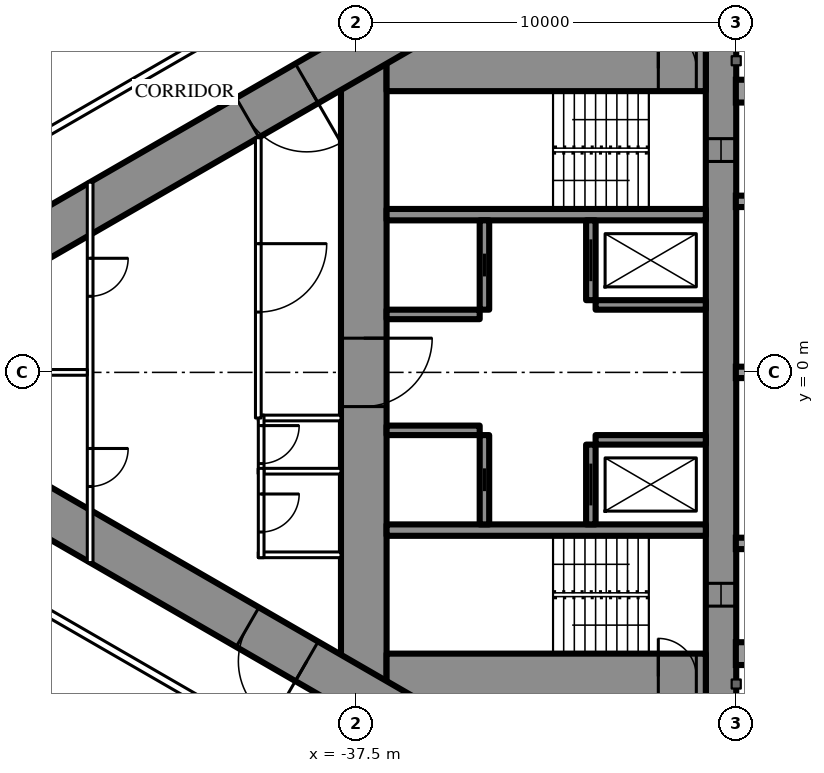
"""IFC4 building model, lengths in metres.
Left out: names, types, materials, properties, quantities, classifications, styles, units other than length and angle.
Written with IfcOpenShell. Run it as: python <this file> out.ifc"""

import sys

from ifc_helpers import new_model, si_unit, direction, frame, frame_2d, origin, place, context, subcontext, project, spatial, rectangle, extrude, element, fill, save


model = new_model("IFC4")
c1 = context("Model", 3, precision=1e-05, world=origin(), true_north=direction((0.0, 1.0)))
c2 = subcontext(c1, "Body", "Model", "MODEL_VIEW")
j1 = project(units=[si_unit("LENGTHUNIT", "METRE"), si_unit("PLANEANGLEUNIT", "RADIAN")], contexts=[c1])
p1 = place(None, origin())
s1 = spatial("IfcSite", under=j1, at=p1, CompositionType="ELEMENT")
p2 = place(p1, origin())
s2 = spatial("IfcBuilding", under=s1, at=p2, CompositionType="ELEMENT")
p3 = place(p2, frame((0.0, 0.0, 28.5)))
s3 = spatial("IfcBuildingStorey", under=s2, at=p3, CompositionType="ELEMENT", Elevation=28.5)
p4 = place(p3, frame((-27.9, 8.6, 0.0), z_axis=(0.0, 0.0, 1.0), x_axis=(0.0, -1.0, 0.0)))
e1 = element("IfcWall", 1, at=p4, inside=s3, PredefinedType="SHEAR", context=c2, shape_type="SweptSolid", body=[
    extrude(rectangle(XDim=17.2, YDim=0.8, at=frame_2d((8.6, 0.0))), origin(), (0.0, 0.0, 1.0), 3.5),
])
p5 = place(p4, frame((2.45, 0.0, 0.6)))
e2 = element("IfcOpeningElement", 2, at=p5, cuts=e1, PredefinedType="OPENING", context=c2, shape_type="SweptSolid", body=[
    extrude(rectangle(XDim=0.6, YDim=2.1, at=frame_2d((0.3, 1.05))), frame((0.0, 0.41, 0.0), z_axis=(0.0, -1.0, 0.0), x_axis=(1.0, 0.0, 0.0)), (0.0, 0.0, 1.0), 0.82),
])
p6 = place(p4, frame((14.15, 0.0, 0.6)))
e3 = element("IfcOpeningElement", 3, at=p6, cuts=e1, PredefinedType="OPENING", context=c2, shape_type="SweptSolid", body=[
    extrude(rectangle(XDim=0.6, YDim=2.1, at=frame_2d((0.3, 1.05))), frame((0.0, 0.41, 0.0), z_axis=(0.0, -1.0, 0.0), x_axis=(1.0, 0.0, 0.0)), (0.0, 0.0, 1.0), 0.82),
])
p7 = place(p3, frame((-37.3, 8.6, 0.0), z_axis=(0.0, 0.0, 1.0), x_axis=(0.0, -1.0, 0.0)))
e4 = element("IfcWall", 4, at=p7, inside=s3, PredefinedType="SHEAR", context=c2, shape_type="SweptSolid", body=[
    extrude(rectangle(XDim=17.2, YDim=1.2, at=frame_2d((8.6, 0.0))), origin(), (0.0, 0.0, 1.0), 3.5),
])
p8 = place(p7, frame((7.7, 0.0, 0.0)))
e5 = element("IfcOpeningElement", 5, at=p8, cuts=e4, PredefinedType="OPENING", context=c2, shape_type="SweptSolid", body=[
    extrude(rectangle(XDim=1.8, YDim=2.2, at=frame_2d((0.9, 1.1))), frame((0.0, 0.61, 0.0), z_axis=(0.0, -1.0, 0.0), x_axis=(1.0, 0.0, 0.0)), (0.0, 0.0, 1.0), 1.22),
])
p9 = place(p3, frame((-28.3, 8.0, 0.0), z_axis=(0.0, 0.0, 1.0), x_axis=(-1.0, 0.0, 0.0)))
e6 = element("IfcWall", 6, at=p9, inside=s3, PredefinedType="SHEAR", context=c2, shape_type="SweptSolid", body=[
    extrude(rectangle(XDim=8.4, YDim=1.2, at=frame_2d((4.2, 0.0))), origin(), (0.0, 0.0, 1.0), 3.5),
])
p10 = place(p9, frame((0.25, 0.0, 0.0)))
e7 = element("IfcOpeningElement", 7, at=p10, cuts=e6, PredefinedType="OPENING", context=c2, shape_type="SweptSolid", body=[
    extrude(rectangle(XDim=1.0, YDim=2.2, at=frame_2d((0.5, 1.1))), frame((0.0, 0.61, 0.0), z_axis=(0.0, -1.0, 0.0), x_axis=(1.0, 0.0, 0.0)), (0.0, 0.0, 1.0), 1.22),
])
p11 = place(p3, frame((-28.3, -8.0, 0.0), z_axis=(0.0, 0.0, 1.0), x_axis=(-1.0, 0.0, 0.0)))
e8 = element("IfcWall", 8, at=p11, inside=s3, PredefinedType="SHEAR", context=c2, shape_type="SweptSolid", body=[
    extrude(rectangle(XDim=8.4, YDim=1.2, at=frame_2d((4.2, 0.0))), origin(), (0.0, 0.0, 1.0), 3.5),
])
p12 = place(p11, frame((0.25, 0.0, 0.0)))
e9 = element("IfcOpeningElement", 9, at=p12, cuts=e8, PredefinedType="OPENING", context=c2, shape_type="SweptSolid", body=[
    extrude(rectangle(XDim=1.0, YDim=2.2, at=frame_2d((0.5, 1.1))), frame((0.0, 0.61, 0.0), z_axis=(0.0, -1.0, 0.0), x_axis=(1.0, 0.0, 0.0)), (0.0, 0.0, 1.0), 1.22),
])
for number, where, z_axis, x_axis in (
    (10, (-28.3, 4.15, 0.0), (0.0, 0.0, 1.0), (-1.0, 0.0, 0.0)),
    (11, (-28.3, -4.15, 0.0), (0.0, 0.0, 1.0), (-1.0, 0.0, 0.0)),
):
    element("IfcWall", number, at=place(p3, frame(where, z_axis=z_axis, x_axis=x_axis)), inside=s3, PredefinedType="SHEAR", context=c2, shape_type="SweptSolid", body=[
        extrude(rectangle(XDim=8.4, YDim=0.3, at=frame_2d((4.2, 0.0))), origin(), (0.0, 0.0, 1.0), 3.5),
    ])
p13 = place(p3, frame((-31.325, 4.0, 0.0), z_axis=(0.0, 0.0, 1.0), x_axis=(0.0, -1.0, 0.0)))
e12 = element("IfcWall", 12, at=p13, inside=s3, PredefinedType="SHEAR", context=c2, shape_type="SweptSolid", body=[
    extrude(rectangle(XDim=2.1, YDim=0.25, at=frame_2d((1.05, 0.0))), origin(), (0.0, 0.0, 1.0), 3.5),
])
p14 = place(p13, frame((0.5, 0.0, 0.0)))
e13 = element("IfcOpeningElement", 13, at=p14, cuts=e12, PredefinedType="OPENING", context=c2, shape_type="SweptSolid", body=[
    extrude(rectangle(XDim=1.1, YDim=2.2, at=frame_2d((0.55, 1.1))), frame((0.0, 0.135, 0.0), z_axis=(0.0, -1.0, 0.0), x_axis=(1.0, 0.0, 0.0)), (0.0, 0.0, 1.0), 0.27),
])
p15 = place(p3, frame((-34.125, 4.0, 0.0), z_axis=(0.0, 0.0, 1.0), x_axis=(0.0, -1.0, 0.0)))
e14 = element("IfcWall", 14, at=p15, inside=s3, PredefinedType="SHEAR", context=c2, shape_type="SweptSolid", body=[
    extrude(rectangle(XDim=2.35, YDim=0.25, at=frame_2d((1.175, 0.0))), origin(), (0.0, 0.0, 1.0), 3.5),
])
p16 = place(p15, frame((0.875, 0.0, 0.0)))
e15 = element("IfcOpeningElement", 15, at=p16, cuts=e14, PredefinedType="OPENING", context=c2, shape_type="SweptSolid", body=[
    extrude(rectangle(XDim=0.6, YDim=2.0, at=frame_2d((0.3, 1.0))), frame((0.0, 0.135, 0.0), z_axis=(0.0, -1.0, 0.0), x_axis=(1.0, 0.0, 0.0)), (0.0, 0.0, 1.0), 0.27),
])
p17 = place(p3, frame((-28.3, 1.775, 0.0), z_axis=(0.0, 0.0, 1.0), x_axis=(-1.0, 0.0, 0.0)))
e16 = element("IfcWall", 16, at=p17, inside=s3, PredefinedType="SHEAR", context=c2, shape_type="SweptSolid", body=[
    extrude(rectangle(XDim=2.9, YDim=0.25, at=frame_2d((1.45, 0.0))), origin(), (0.0, 0.0, 1.0), 3.5),
])
p18 = place(p3, frame((-34.25, 1.525, 0.0), z_axis=(0.0, 0.0, 1.0), x_axis=(-1.0, 0.0, 0.0)))
e17 = element("IfcWall", 17, at=p18, inside=s3, PredefinedType="SHEAR", context=c2, shape_type="SweptSolid", body=[
    extrude(rectangle(XDim=2.45, YDim=0.25, at=frame_2d((1.225, 0.0))), origin(), (0.0, 0.0, 1.0), 3.5),
])
p19 = place(p3, frame((-31.325, -1.9, 0.0), z_axis=(0.0, 0.0, 1.0), x_axis=(0.0, -1.0, 0.0)))
e18 = element("IfcWall", 18, at=p19, inside=s3, PredefinedType="SHEAR", context=c2, shape_type="SweptSolid", body=[
    extrude(rectangle(XDim=2.1, YDim=0.25, at=frame_2d((1.05, 0.0))), origin(), (0.0, 0.0, 1.0), 3.5),
])
p20 = place(p19, frame((0.5, 0.0, 0.0)))
e19 = element("IfcOpeningElement", 19, at=p20, cuts=e18, PredefinedType="OPENING", context=c2, shape_type="SweptSolid", body=[
    extrude(rectangle(XDim=1.1, YDim=2.2, at=frame_2d((0.55, 1.1))), frame((0.0, 0.135, 0.0), z_axis=(0.0, -1.0, 0.0), x_axis=(1.0, 0.0, 0.0)), (0.0, 0.0, 1.0), 0.27),
])
p21 = place(p3, frame((-34.125, -1.65, 0.0), z_axis=(0.0, 0.0, 1.0), x_axis=(0.0, -1.0, 0.0)))
e20 = element("IfcWall", 20, at=p21, inside=s3, PredefinedType="SHEAR", context=c2, shape_type="SweptSolid", body=[
    extrude(rectangle(XDim=2.35, YDim=0.25, at=frame_2d((1.175, 0.0))), origin(), (0.0, 0.0, 1.0), 3.5),
])
p22 = place(p21, frame((0.875, 0.0, 0.0)))
e21 = element("IfcOpeningElement", 21, at=p22, cuts=e20, PredefinedType="OPENING", context=c2, shape_type="SweptSolid", body=[
    extrude(rectangle(XDim=0.6, YDim=2.0, at=frame_2d((0.3, 1.0))), frame((0.0, 0.135, 0.0), z_axis=(0.0, -1.0, 0.0), x_axis=(1.0, 0.0, 0.0)), (0.0, 0.0, 1.0), 0.27),
])
p23 = place(p3, frame((-28.3, -1.775, 0.0), z_axis=(0.0, 0.0, 1.0), x_axis=(-1.0, 0.0, 0.0)))
e22 = element("IfcWall", 22, at=p23, inside=s3, PredefinedType="SHEAR", context=c2, shape_type="SweptSolid", body=[
    extrude(rectangle(XDim=2.9, YDim=0.25, at=frame_2d((1.45, 0.0))), origin(), (0.0, 0.0, 1.0), 3.5),
])
p24 = place(p3, frame((-34.25, -1.525, 0.0), z_axis=(0.0, 0.0, 1.0), x_axis=(-1.0, 0.0, 0.0)))
e23 = element("IfcWall", 23, at=p24, inside=s3, PredefinedType="SHEAR", context=c2, shape_type="SweptSolid", body=[
    extrude(rectangle(XDim=2.45, YDim=0.25, at=frame_2d((1.225, 0.0))), origin(), (0.0, 0.0, 1.0), 3.5),
])
p25 = place(p3, frame((-27.2, 14.3, 0.0), z_axis=(0.0, 0.0, 1.0), x_axis=(-0.866026593062, -0.499997940104, 0.0)))
e24 = element("IfcWall", 24, at=p25, inside=s3, PredefinedType="SHEAR", context=c2, shape_type="SweptSolid", body=[
    extrude(rectangle(XDim=28.946, YDim=1.2, at=frame_2d((14.473, 0.0))), origin(), (0.0, 0.0, 1.0), 3.5),
])
p26 = place(p25, frame((4.6, 0.0, 0.0)))
e25 = element("IfcOpeningElement", 25, at=p26, cuts=e24, PredefinedType="OPENING", context=c2, shape_type="SweptSolid", body=[
    extrude(rectangle(XDim=1.0, YDim=2.2, at=frame_2d((0.5, 1.1))), frame((0.0, 0.61, 0.0), z_axis=(0.0, -1.0, 0.0), x_axis=(1.0, 0.0, 0.0)), (0.0, 0.0, 1.0), 1.22),
])
p27 = place(p25, frame((13.395, 0.0, 0.0)))
e26 = element("IfcOpeningElement", 26, at=p27, cuts=e24, PredefinedType="OPENING", context=c2, shape_type="SweptSolid", body=[
    extrude(rectangle(XDim=1.8, YDim=2.2, at=frame_2d((0.9, 1.1))), frame((0.0, 0.61, 0.0), z_axis=(0.0, -1.0, 0.0), x_axis=(1.0, 0.0, 0.0)), (0.0, 0.0, 1.0), 1.22),
])
p28 = place(p3, frame((-27.2, -14.3, 0.0), z_axis=(0.0, 0.0, 1.0), x_axis=(-0.866024021859, 0.500002393557, 0.0)))
e27 = element("IfcWall", 27, at=p28, inside=s3, PredefinedType="SHEAR", context=c2, shape_type="SweptSolid", body=[
    extrude(rectangle(XDim=27.907, YDim=1.2, at=frame_2d((13.954, 0.0))), origin(), (0.0, 0.0, 1.0), 3.5),
])
p29 = place(p28, frame((4.6, 0.0, 0.0)))
e28 = element("IfcOpeningElement", 28, at=p29, cuts=e27, PredefinedType="OPENING", context=c2, shape_type="SweptSolid", body=[
    extrude(rectangle(XDim=1.0, YDim=2.2, at=frame_2d((0.5, 1.1))), frame((0.0, 0.61, 0.0), z_axis=(0.0, -1.0, 0.0), x_axis=(1.0, 0.0, 0.0)), (0.0, 0.0, 1.0), 1.22),
])
p30 = place(p28, frame((13.395, 0.0, 0.0)))
e29 = element("IfcOpeningElement", 29, at=p30, cuts=e27, PredefinedType="OPENING", context=c2, shape_type="SweptSolid", body=[
    extrude(rectangle(XDim=1.8, YDim=2.2, at=frame_2d((0.9, 1.1))), frame((0.0, 0.61, 0.0), z_axis=(0.0, -1.0, 0.0), x_axis=(1.0, 0.0, 0.0)), (0.0, 0.0, 1.0), 1.22),
])
p31 = place(p3, frame((-37.7, 10.894, 0.0), z_axis=(0.0, 0.0, 1.0), x_axis=(-0.866027905338, -0.499995667157, 0.0)))
e30 = element("IfcWall", 30, at=p31, inside=s3, PredefinedType="PARTITIONING", context=c2, shape_type="SweptSolid", body=[
    extrude(rectangle(XDim=21.787, YDim=0.2, at=frame_2d((10.894, 0.0))), origin(), (0.0, 0.0, 1.0), 3.25),
])
p32 = place(p31, frame((16.008, 0.0, 0.0)))
e31 = element("IfcOpeningElement", 31, at=p32, cuts=e30, PredefinedType="OPENING", context=c2, shape_type="SweptSolid", body=[
    extrude(rectangle(XDim=0.95, YDim=2.2, at=frame_2d((0.475, 1.1))), frame((0.0, 0.11, 0.0), z_axis=(0.0, -1.0, 0.0), x_axis=(1.0, 0.0, 0.0)), (0.0, 0.0, 1.0), 0.22),
])
p33 = place(p31, frame((20.058, 0.0, 0.0)))
e32 = element("IfcOpeningElement", 32, at=p33, cuts=e30, PredefinedType="OPENING", context=c2, shape_type="SweptSolid", body=[
    extrude(rectangle(XDim=0.95, YDim=2.2, at=frame_2d((0.475, 1.1))), frame((0.0, 0.11, 0.0), z_axis=(0.0, -1.0, 0.0), x_axis=(1.0, 0.0, 0.0)), (0.0, 0.0, 1.0), 0.22),
])
p34 = place(p31, frame((2.95, 0.0, 0.0)))
e33 = element("IfcOpeningElement", 33, at=p34, cuts=e30, PredefinedType="OPENING", context=c2, shape_type="SweptSolid", body=[
    extrude(rectangle(XDim=0.95, YDim=2.2, at=frame_2d((0.475, 1.1))), frame((0.0, 0.11, 0.0), z_axis=(0.0, -1.0, 0.0), x_axis=(1.0, 0.0, 0.0)), (0.0, 0.0, 1.0), 0.22),
])
p35 = place(p3, frame((-36.92, -11.344, 0.0), z_axis=(0.0, 0.0, 1.0), x_axis=(-0.866028313256, 0.499994960614, 0.0)))
e34 = element("IfcWall", 34, at=p35, inside=s3, PredefinedType="PARTITIONING", context=c2, shape_type="SweptSolid", body=[
    extrude(rectangle(XDim=22.568, YDim=0.2, at=frame_2d((11.284, 0.0))), origin(), (0.0, 0.0, 1.0), 3.25),
])
p36 = place(p35, frame((12.68, 0.0, 0.0)))
e35 = element("IfcOpeningElement", 35, at=p36, cuts=e34, PredefinedType="OPENING", context=c2, shape_type="SweptSolid", body=[
    extrude(rectangle(XDim=0.95, YDim=2.2, at=frame_2d((0.475, 1.1))), frame((0.0, 0.11, 0.0), z_axis=(0.0, -1.0, 0.0), x_axis=(1.0, 0.0, 0.0)), (0.0, 0.0, 1.0), 0.22),
])
p37 = place(p35, frame((3.35, 0.0, 0.0)))
e36 = element("IfcOpeningElement", 36, at=p37, cuts=e34, PredefinedType="OPENING", context=c2, shape_type="SweptSolid", body=[
    extrude(rectangle(XDim=1.0, YDim=2.2, at=frame_2d((0.5, 1.1))), frame((0.0, 0.11, 0.0), z_axis=(0.0, -1.0, 0.0), x_axis=(1.0, 0.0, 0.0)), (0.0, 0.0, 1.0), 0.22),
])
for number, where, z_axis, x_axis in (
    (37, (-37.9, -1.2, 0.0), (0.0, 0.0, 1.0), (-1.0, 0.0, 0.0)),
    (38, (-37.9, -2.6, 0.0), (0.0, 0.0, 1.0), (-1.0, 0.0, 0.0)),
    (39, (-37.9, -4.8, 0.0), (0.0, 0.0, 1.0), (-1.0, 0.0, 0.0)),
):
    element("IfcWall", number, at=place(p3, frame(where, z_axis=z_axis, x_axis=x_axis)), inside=s3, PredefinedType="PARTITIONING", context=c2, shape_type="SweptSolid", body=[
        extrude(rectangle(XDim=2.175, YDim=0.15, at=frame_2d((1.087, 0.0))), origin(), (0.0, 0.0, 1.0), 3.25),
    ])
p38 = place(p3, frame((-40.0, -1.125, 0.0), z_axis=(0.0, 0.0, 1.0), x_axis=(0.0, -1.0, 0.0)))
e40 = element("IfcWall", 40, at=p38, inside=s3, PredefinedType="PARTITIONING", context=c2, shape_type="SweptSolid", body=[
    extrude(rectangle(XDim=1.55, YDim=0.15, at=frame_2d((0.775, 0.0))), origin(), (0.0, 0.0, 1.0), 3.25),
])
p39 = place(p38, frame((0.275, 0.0, 0.0)))
e41 = element("IfcOpeningElement", 41, at=p39, cuts=e40, PredefinedType="OPENING", context=c2, shape_type="SweptSolid", body=[
    extrude(rectangle(XDim=1.0, YDim=2.2, at=frame_2d((0.5, 1.1))), frame((0.0, 0.085, 0.0), z_axis=(0.0, -1.0, 0.0), x_axis=(1.0, 0.0, 0.0)), (0.0, 0.0, 1.0), 0.17),
])
p40 = place(p3, frame((-40.0, -2.525, 0.0), z_axis=(0.0, 0.0, 1.0), x_axis=(0.0, -1.0, 0.0)))
e42 = element("IfcWall", 42, at=p40, inside=s3, PredefinedType="PARTITIONING", context=c2, shape_type="SweptSolid", body=[
    extrude(rectangle(XDim=2.35, YDim=0.15, at=frame_2d((1.175, 0.0))), origin(), (0.0, 0.0, 1.0), 3.25),
])
p41 = place(p40, frame((0.675, 0.0, 0.0)))
e43 = element("IfcOpeningElement", 43, at=p41, cuts=e42, PredefinedType="OPENING", context=c2, shape_type="SweptSolid", body=[
    extrude(rectangle(XDim=1.0, YDim=2.2, at=frame_2d((0.5, 1.1))), frame((0.0, 0.085, 0.0), z_axis=(0.0, -1.0, 0.0), x_axis=(1.0, 0.0, 0.0)), (0.0, 0.0, 1.0), 0.17),
])
p42 = place(p3, frame((-40.075, 6.174, 0.0), z_axis=(0.0, 0.0, 1.0), x_axis=(0.0, -1.0, 0.0)))
e44 = element("IfcWall", 44, at=p42, inside=s3, PredefinedType="PARTITIONING", context=c2, shape_type="SweptSolid", body=[
    extrude(rectangle(XDim=7.374, YDim=0.15, at=frame_2d((3.687, 0.0))), origin(), (0.0, 0.0, 1.0), 3.25),
])
p43 = place(p42, frame((2.787, 0.0, 0.0)))
e45 = element("IfcOpeningElement", 45, at=p43, cuts=e44, PredefinedType="OPENING", context=c2, shape_type="SweptSolid", body=[
    extrude(rectangle(XDim=1.8, YDim=2.2, at=frame_2d((0.9, 1.1))), frame((0.0, 0.085, 0.0), z_axis=(0.0, -1.0, 0.0), x_axis=(1.0, 0.0, 0.0)), (0.0, 0.0, 1.0), 0.17),
])
p44 = place(p3, frame((-44.5, 5.005, 0.0), z_axis=(0.0, 0.0, 1.0), x_axis=(0.0, -1.0, 0.0)))
e46 = element("IfcWall", 46, at=p44, inside=s3, PredefinedType="PARTITIONING", context=c2, shape_type="SweptSolid", body=[
    extrude(rectangle(XDim=10.009, YDim=0.15, at=frame_2d((5.005, 0.0))), origin(), (0.0, 0.0, 1.0), 2.45),
])
p45 = place(p44, frame((2.002, 0.0, 0.0)))
e47 = element("IfcOpeningElement", 47, at=p45, cuts=e46, PredefinedType="OPENING", context=c2, shape_type="SweptSolid", body=[
    extrude(rectangle(XDim=1.0, YDim=2.2, at=frame_2d((0.5, 1.1))), frame((0.0, 0.085, 0.0), z_axis=(0.0, -1.0, 0.0), x_axis=(1.0, 0.0, 0.0)), (0.0, 0.0, 1.0), 0.17),
])
p46 = place(p44, frame((7.007, 0.0, 0.0)))
e48 = element("IfcOpeningElement", 48, at=p46, cuts=e46, PredefinedType="OPENING", context=c2, shape_type="SweptSolid", body=[
    extrude(rectangle(XDim=1.0, YDim=2.2, at=frame_2d((0.5, 1.1))), frame((0.0, 0.085, 0.0), z_axis=(0.0, -1.0, 0.0), x_axis=(1.0, 0.0, 0.0)), (0.0, 0.0, 1.0), 0.17),
])
p47 = place(p3, frame((-44.575, 0.0, 0.0), z_axis=(0.0, 0.0, 1.0), x_axis=(-1.0, 0.0, 0.0)))
e49 = element("IfcWall", 49, at=p47, inside=s3, PredefinedType="PARTITIONING", context=c2, shape_type="SweptSolid", body=[
    extrude(rectangle(XDim=8.593, YDim=0.15, at=frame_2d((4.297, 0.0))), origin(), (0.0, 0.0, 1.0), 2.25),
])
p48 = place(p39, origin())
e50 = element("IfcDoor", 50, at=p48, inside=s3, OperationType="SINGLE_SWING_LEFT", PredefinedType="DOOR", context=c2, shape_type="SweptSolid", body=[
    extrude(rectangle(XDim=1.0, YDim=2.2, at=frame_2d((0.5, 1.1))), frame((0.0, 0.025, 0.0), z_axis=(0.0, -1.0, 0.0), x_axis=(1.0, 0.0, 0.0)), (0.0, 0.0, 1.0), 0.05),
])
fill(e41, e50)
p49 = place(p41, origin())
e51 = element("IfcDoor", 51, at=p49, inside=s3, OperationType="SINGLE_SWING_LEFT", PredefinedType="DOOR", context=c2, shape_type="SweptSolid", body=[
    extrude(rectangle(XDim=1.0, YDim=2.2, at=frame_2d((0.5, 1.1))), frame((0.0, 0.025, 0.0), z_axis=(0.0, -1.0, 0.0), x_axis=(1.0, 0.0, 0.0)), (0.0, 0.0, 1.0), 0.05),
])
fill(e43, e51)
p50 = place(p43, origin())
e52 = element("IfcDoor", 52, at=p50, inside=s3, OperationType="DOUBLE_DOOR_SINGLE_SWING", PredefinedType="DOOR", context=c2, shape_type="SweptSolid", body=[
    extrude(rectangle(XDim=1.8, YDim=2.2, at=frame_2d((0.9, 1.1))), frame((0.0, 0.025, 0.0), z_axis=(0.0, -1.0, 0.0), x_axis=(1.0, 0.0, 0.0)), (0.0, 0.0, 1.0), 0.05),
])
fill(e45, e52)
p51 = place(p45, origin())
e53 = element("IfcDoor", 53, at=p51, inside=s3, OperationType="SINGLE_SWING_LEFT", PredefinedType="DOOR", context=c2, shape_type="SweptSolid", body=[
    extrude(rectangle(XDim=1.0, YDim=2.2, at=frame_2d((0.5, 1.1))), frame((0.0, 0.025, 0.0), z_axis=(0.0, -1.0, 0.0), x_axis=(1.0, 0.0, 0.0)), (0.0, 0.0, 1.0), 0.05),
])
fill(e47, e53)
p52 = place(p46, origin())
e54 = element("IfcDoor", 54, at=p52, inside=s3, OperationType="SINGLE_SWING_LEFT", PredefinedType="DOOR", context=c2, shape_type="SweptSolid", body=[
    extrude(rectangle(XDim=1.0, YDim=2.2, at=frame_2d((0.5, 1.1))), frame((0.0, 0.025, 0.0), z_axis=(0.0, -1.0, 0.0), x_axis=(1.0, 0.0, 0.0)), (0.0, 0.0, 1.0), 0.05),
])
fill(e48, e54)
p53 = place(p27, origin())
e55 = element("IfcDoor", 55, at=p53, inside=s3, OperationType="DOUBLE_DOOR_SINGLE_SWING", PredefinedType="DOOR", context=c2, shape_type="SweptSolid", body=[
    extrude(rectangle(XDim=1.8, YDim=2.2, at=frame_2d((0.9, 1.1))), frame((0.0, 0.025, 0.0), z_axis=(0.0, -1.0, 0.0), x_axis=(1.0, 0.0, 0.0)), (0.0, 0.0, 1.0), 0.05),
])
fill(e26, e55)
p54 = place(p30, origin())
e56 = element("IfcDoor", 56, at=p54, inside=s3, OperationType="DOUBLE_DOOR_SINGLE_SWING", PredefinedType="DOOR", context=c2, shape_type="SweptSolid", body=[
    extrude(rectangle(XDim=1.8, YDim=2.2, at=frame_2d((0.9, 1.1))), frame((0.0, 0.025, 0.0), z_axis=(0.0, -1.0, 0.0), x_axis=(1.0, 0.0, 0.0)), (0.0, 0.0, 1.0), 0.05),
])
fill(e29, e56)
p55 = place(p8, origin())
e57 = element("IfcDoor", 57, at=p55, inside=s3, OperationType="DOUBLE_DOOR_SINGLE_SWING", PredefinedType="DOOR", context=c2, shape_type="SweptSolid", body=[
    extrude(rectangle(XDim=1.8, YDim=2.2, at=frame_2d((0.9, 1.1))), frame((0.0, 0.025, 0.0), z_axis=(0.0, -1.0, 0.0), x_axis=(1.0, 0.0, 0.0)), (0.0, 0.0, 1.0), 0.05),
])
fill(e5, e57)
p56 = place(p10, origin())
e58 = element("IfcDoor", 58, at=p56, inside=s3, OperationType="SINGLE_SWING_RIGHT", PredefinedType="DOOR", context=c2, shape_type="SweptSolid", body=[
    extrude(rectangle(XDim=1.0, YDim=2.2, at=frame_2d((0.5, 1.1))), frame((0.0, 0.025, 0.0), z_axis=(0.0, -1.0, 0.0), x_axis=(1.0, 0.0, 0.0)), (0.0, 0.0, 1.0), 0.05),
])
fill(e7, e58)
p57 = place(p12, origin())
e59 = element("IfcDoor", 59, at=p57, inside=s3, OperationType="SINGLE_SWING_RIGHT", PredefinedType="DOOR", context=c2, shape_type="SweptSolid", body=[
    extrude(rectangle(XDim=1.0, YDim=2.2, at=frame_2d((0.5, 1.1))), frame((0.0, 0.025, 0.0), z_axis=(0.0, -1.0, 0.0), x_axis=(1.0, 0.0, 0.0)), (0.0, 0.0, 1.0), 0.05),
])
fill(e9, e59)
p58 = place(p14, origin())
e60 = element("IfcDoor", 60, at=p58, inside=s3, OperationType="SLIDING_TO_LEFT", PredefinedType="USERDEFINED", context=c2, shape_type="SweptSolid", body=[
    extrude(rectangle(XDim=1.1, YDim=2.2, at=frame_2d((0.55, 1.1))), frame((0.0, 0.025, 0.0), z_axis=(0.0, -1.0, 0.0), x_axis=(1.0, 0.0, 0.0)), (0.0, 0.0, 1.0), 0.05),
])
fill(e13, e60)
p59 = place(p20, origin())
e61 = element("IfcDoor", 61, at=p59, inside=s3, OperationType="SLIDING_TO_LEFT", PredefinedType="USERDEFINED", context=c2, shape_type="SweptSolid", body=[
    extrude(rectangle(XDim=1.1, YDim=2.2, at=frame_2d((0.55, 1.1))), frame((0.0, 0.025, 0.0), z_axis=(0.0, -1.0, 0.0), x_axis=(1.0, 0.0, 0.0)), (0.0, 0.0, 1.0), 0.05),
])
fill(e19, e61)
p60 = place(p16, origin())
e62 = element("IfcDoor", 62, at=p60, inside=s3, OperationType="SLIDING_TO_LEFT", PredefinedType="DOOR", context=c2, shape_type="SweptSolid", body=[
    extrude(rectangle(XDim=0.6, YDim=2.0, at=frame_2d((0.3, 1.0))), frame((0.0, 0.025, 0.0), z_axis=(0.0, -1.0, 0.0), x_axis=(1.0, 0.0, 0.0)), (0.0, 0.0, 1.0), 0.05),
])
fill(e15, e62)
p61 = place(p22, origin())
e63 = element("IfcDoor", 63, at=p61, inside=s3, OperationType="SLIDING_TO_LEFT", PredefinedType="DOOR", context=c2, shape_type="SweptSolid", body=[
    extrude(rectangle(XDim=0.6, YDim=2.0, at=frame_2d((0.3, 1.0))), frame((0.0, 0.025, 0.0), z_axis=(0.0, -1.0, 0.0), x_axis=(1.0, 0.0, 0.0)), (0.0, 0.0, 1.0), 0.05),
])
fill(e21, e63)
p62 = place(p5, origin())
e64 = element("IfcWindow", 64, at=p62, inside=s3, PartitioningType="SINGLE_PANEL", PredefinedType="WINDOW", context=c2, shape_type="SweptSolid", body=[
    extrude(rectangle(XDim=0.6, YDim=2.1, at=frame_2d((0.3, 1.05))), frame((0.0, 0.03, 0.0), z_axis=(0.0, -1.0, 0.0), x_axis=(1.0, 0.0, 0.0)), (0.0, 0.0, 1.0), 0.06),
])
fill(e2, e64)
p63 = place(p6, origin())
e65 = element("IfcWindow", 65, at=p63, inside=s3, PartitioningType="SINGLE_PANEL", PredefinedType="WINDOW", context=c2, shape_type="SweptSolid", body=[
    extrude(rectangle(XDim=0.6, YDim=2.1, at=frame_2d((0.3, 1.05))), frame((0.0, 0.03, 0.0), z_axis=(0.0, -1.0, 0.0), x_axis=(1.0, 0.0, 0.0)), (0.0, 0.0, 1.0), 0.06),
])
fill(e3, e65)
save(model, sys.argv[1])
